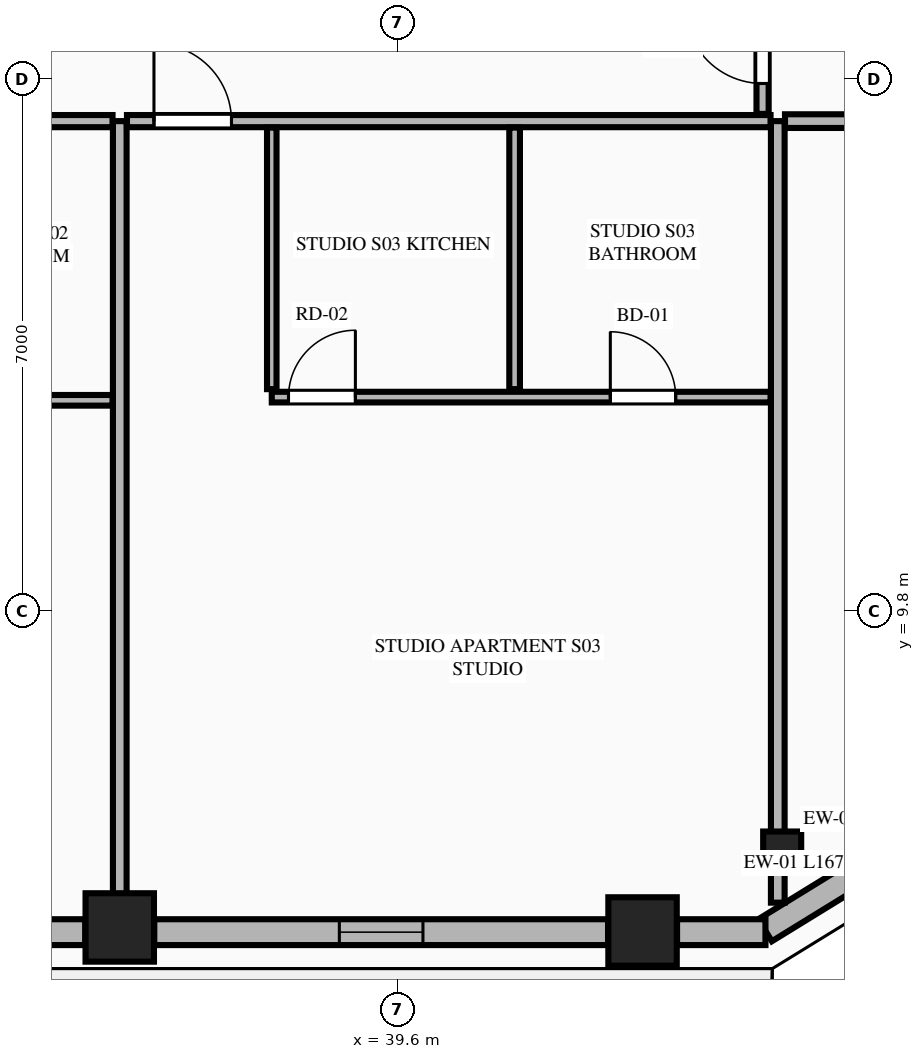
"""IFC4 building model, lengths in metres.
Left out: names, types, materials, properties, quantities, classifications, styles, units other than length and angle.
Written with IfcOpenShell. Run it as: python <this file> out.ifc"""

import sys

from ifc_helpers import new_model, si_unit, direction, frame, frame_2d, origin, origin_2d, place, context, subcontext, project, spatial, rectangle, extrude, element, fill, save


model = new_model("IFC4")
c1 = context("Model", 3, precision=1e-05, world=origin(), true_north=direction((0.0, 1.0)))
c2 = subcontext(c1, "Body", "Model", "MODEL_VIEW")
j1 = project(units=[si_unit("LENGTHUNIT", "METRE"), si_unit("PLANEANGLEUNIT", "RADIAN")], contexts=[c1])
p1 = place(None, origin())
s1 = spatial("IfcSite", under=j1, at=p1, CompositionType="ELEMENT")
p2 = place(p1, origin())
s2 = spatial("IfcBuilding", under=s1, at=p2, CompositionType="ELEMENT")
p3 = place(p2, frame((0.0, 0.0, 186.1)))
s3 = spatial("IfcBuildingStorey", under=s2, at=p3, CompositionType="ELEMENT", Elevation=186.1)
for number, where, z_axis, x_axis in (
    (1, (35.943, 5.642, 0.0), (0.0, 0.0, 1.0), (1.0, 0.0, 0.0)),
    (2, (42.821, 5.589, 0.0), (0.0, 0.0, 1.0), (1.0, 0.0, 0.0)),
):
    element("IfcColumn", number, at=place(p3, frame(where, z_axis=z_axis, x_axis=x_axis)), inside=s3, PredefinedType="COLUMN", context=c2, shape_type="SweptSolid", body=[
        extrude(rectangle(XDim=0.9, YDim=0.9, at=origin_2d()), origin(), (0.0, 0.0, 1.0), 3.55),
    ])
p4 = place(p3, frame((44.658, 6.654, 0.0), z_axis=(0.0, 0.0, 1.0), x_axis=(0.865230187018, 0.501374833306, 0.0)))
e3 = element("IfcColumn", 3, at=p4, inside=s3, PredefinedType="PILASTER", context=c2, shape_type="SweptSolid", body=[
    extrude(rectangle(XDim=0.5, YDim=0.35, at=origin_2d()), origin(), (0.0, 0.0, 1.0), 3.55),
])
p5 = place(p3, frame((44.433, 5.605, 0.0), z_axis=(0.0, 0.0, 1.0), x_axis=(0.851778214877, 0.523902541185, 0.0)))
e4 = element("IfcWall", 4, at=p5, inside=s3, PredefinedType="STANDARD", context=c2, shape_type="SweptSolid", body=[
    extrude(rectangle(XDim=1.678, YDim=0.34, at=frame_2d((0.839, 0.0))), origin(), (0.0, 0.0, 1.0), 3.35),
])
p6 = place(p3, frame((29.311, 5.58, 0.0), z_axis=(0.0, 0.0, 1.0), x_axis=(1.0, 0.0, 0.0)))
e5 = element("IfcWall", 5, at=p6, inside=s3, PredefinedType="STANDARD", context=c2, shape_type="SweptSolid", body=[
    extrude(rectangle(XDim=6.178, YDim=0.34, at=frame_2d((3.089, 0.0))), origin(), (0.0, 0.0, 1.0), 2.883),
])
p7 = place(p6, frame((2.539, 0.0, 0.0)))
e6 = element("IfcOpeningElement", 6, at=p7, cuts=e5, PredefinedType="OPENING", context=c2, shape_type="SweptSolid", body=[
    extrude(rectangle(XDim=1.1, YDim=2.25, at=frame_2d((0.55, 1.125))), frame((0.0, 0.18, 0.0), z_axis=(0.0, -1.0, 0.0), x_axis=(1.0, 0.0, 0.0)), (0.0, 0.0, 1.0), 0.36),
])
p8 = place(p3, frame((36.397, 5.58, 0.0), z_axis=(0.0, 0.0, 1.0), x_axis=(1.0, 0.0, 0.0)))
e7 = element("IfcWall", 7, at=p8, inside=s3, PredefinedType="STANDARD", context=c2, shape_type="SweptSolid", body=[
    extrude(rectangle(XDim=5.97, YDim=0.34, at=frame_2d((2.985, 0.0))), origin(), (0.0, 0.0, 1.0), 2.883),
])
p9 = place(p8, frame((2.435, 0.0, 0.75)))
e8 = element("IfcOpeningElement", 8, at=p9, cuts=e7, PredefinedType="OPENING", context=c2, shape_type="SweptSolid", body=[
    extrude(rectangle(XDim=1.1, YDim=1.983, at=frame_2d((0.55, 0.991))), frame((0.0, 0.18, 0.0), z_axis=(0.0, -1.0, 0.0), x_axis=(1.0, 0.0, 0.0)), (0.0, 0.0, 1.0), 0.36),
])
p10 = place(p3, frame((43.275, 5.58, 0.0), z_axis=(0.0, 0.0, 1.0), x_axis=(1.0, 0.0, 0.0)))
e9 = element("IfcWall", 9, at=p10, inside=s3, PredefinedType="STANDARD", context=c2, shape_type="SweptSolid", body=[
    extrude(rectangle(XDim=1.163, YDim=0.34, at=frame_2d((0.582, 0.0))), origin(), (0.0, 0.0, 1.0), 3.35),
])
p11 = place(p3, frame((35.943, 5.755, 0.0), z_axis=(0.0, 0.0, 1.0), x_axis=(0.0, 1.0, 0.0)))
e10 = element("IfcWall", 10, at=p11, inside=s3, PredefinedType="PARTITIONING", context=c2, shape_type="SweptSolid", body=[
    extrude(rectangle(XDim=10.495, YDim=0.18, at=frame_2d((5.248, 0.0))), origin(), (0.0, 0.0, 1.0), 2.807),
])
p12 = place(p3, frame((44.6, 5.968, 0.0), z_axis=(0.0, 0.0, 1.0), x_axis=(0.0, 1.0, 0.0)))
e11 = element("IfcWall", 11, at=p12, inside=s3, PredefinedType="PARTITIONING", context=c2, shape_type="SweptSolid", body=[
    extrude(rectangle(XDim=10.282, YDim=0.18, at=frame_2d((5.141, 0.0))), origin(), (0.0, 0.0, 1.0), 3.35),
])
p13 = place(p3, frame((28.952, 16.25, 0.0), z_axis=(0.0, 0.0, 1.0), x_axis=(1.0, 0.0, 0.0)))
e12 = element("IfcWall", 12, at=p13, inside=s3, PredefinedType="PARTITIONING", context=c2, shape_type="SweptSolid", body=[
    extrude(rectangle(XDim=6.896, YDim=0.16, at=frame_2d((3.448, 0.0))), origin(), (0.0, 0.0, 1.0), 3.35),
])
p14 = place(p13, frame((0.355, 0.0, 0.0)))
e13 = element("IfcOpeningElement", 13, at=p14, cuts=e12, PredefinedType="OPENING", context=c2, shape_type="SweptSolid", body=[
    extrude(rectangle(XDim=1.02, YDim=2.25, at=frame_2d((0.51, 1.125))), frame((0.0, 0.09, 0.0), z_axis=(0.0, -1.0, 0.0), x_axis=(1.0, 0.0, 0.0)), (0.0, 0.0, 1.0), 0.18),
])
p15 = place(p3, frame((30.857, 12.577, 0.0), z_axis=(0.0, 0.0, 1.0), x_axis=(1.0, 0.0, 0.0)))
e14 = element("IfcWall", 14, at=p15, inside=s3, PredefinedType="PLUMBINGWALL", context=c2, shape_type="SweptSolid", body=[
    extrude(rectangle(XDim=4.991, YDim=0.14, at=frame_2d((2.496, 0.0))), origin(), (0.0, 0.0, 1.0), 3.35),
])
p16 = place(p15, frame((3.291, 0.0, 0.0)))
e15 = element("IfcOpeningElement", 15, at=p16, cuts=e14, PredefinedType="OPENING", context=c2, shape_type="SweptSolid", body=[
    extrude(rectangle(XDim=0.86, YDim=2.1, at=frame_2d((0.43, 1.05))), frame((0.0, 0.08, 0.0), z_axis=(0.0, -1.0, 0.0), x_axis=(1.0, 0.0, 0.0)), (0.0, 0.0, 1.0), 0.16),
])
p17 = place(p15, frame((0.22, 0.0, 0.0)))
e16 = element("IfcOpeningElement", 16, at=p17, cuts=e14, PredefinedType="OPENING", context=c2, shape_type="SweptSolid", body=[
    extrude(rectangle(XDim=0.88, YDim=2.15, at=frame_2d((0.44, 1.075))), frame((0.0, 0.08, 0.0), z_axis=(0.0, -1.0, 0.0), x_axis=(1.0, 0.0, 0.0)), (0.0, 0.0, 1.0), 0.16),
])
p18 = place(p3, frame((36.038, 16.25, 0.0), z_axis=(0.0, 0.0, 1.0), x_axis=(1.0, 0.0, 0.0)))
e17 = element("IfcWall", 17, at=p18, inside=s3, PredefinedType="PARTITIONING", context=c2, shape_type="SweptSolid", body=[
    extrude(rectangle(XDim=8.467, YDim=0.16, at=frame_2d((4.233, 0.0))), origin(), (0.0, 0.0, 1.0), 3.35),
])
p19 = place(p18, frame((0.355, 0.0, 0.0)))
e18 = element("IfcOpeningElement", 18, at=p19, cuts=e17, PredefinedType="OPENING", context=c2, shape_type="SweptSolid", body=[
    extrude(rectangle(XDim=1.02, YDim=2.25, at=frame_2d((0.51, 1.125))), frame((0.0, 0.09, 0.0), z_axis=(0.0, -1.0, 0.0), x_axis=(1.0, 0.0, 0.0)), (0.0, 0.0, 1.0), 0.18),
])
p20 = place(p3, frame((37.943, 12.724, 0.0), z_axis=(0.0, 0.0, 1.0), x_axis=(0.0, 1.0, 0.0)))
e19 = element("IfcWall", 19, at=p20, inside=s3, PredefinedType="PARTITIONING", context=c2, shape_type="SweptSolid", body=[
    extrude(rectangle(XDim=3.441, YDim=0.125, at=frame_2d((1.72, 0.0))), origin(), (0.0, 0.0, 1.0), 3.35),
])
p21 = place(p3, frame((37.943, 12.619, 0.0), z_axis=(0.0, 0.0, 1.0), x_axis=(1.0, 0.0, 0.0)))
e20 = element("IfcWall", 20, at=p21, inside=s3, PredefinedType="PLUMBINGWALL", context=c2, shape_type="SweptSolid", body=[
    extrude(rectangle(XDim=6.562, YDim=0.14, at=frame_2d((3.281, 0.0))), origin(), (0.0, 0.0, 1.0), 3.35),
])
p22 = place(p21, frame((4.454, 0.0, 0.0)))
e21 = element("IfcOpeningElement", 21, at=p22, cuts=e20, PredefinedType="OPENING", context=c2, shape_type="SweptSolid", body=[
    extrude(rectangle(XDim=0.86, YDim=2.1, at=frame_2d((0.43, 1.05))), frame((0.0, 0.08, 0.0), z_axis=(0.0, -1.0, 0.0), x_axis=(1.0, 0.0, 0.0)), (0.0, 0.0, 1.0), 0.16),
])
p23 = place(p21, frame((0.22, 0.0, 0.0)))
e22 = element("IfcOpeningElement", 22, at=p23, cuts=e20, PredefinedType="OPENING", context=c2, shape_type="SweptSolid", body=[
    extrude(rectangle(XDim=0.88, YDim=2.15, at=frame_2d((0.44, 1.075))), frame((0.0, 0.08, 0.0), z_axis=(0.0, -1.0, 0.0), x_axis=(1.0, 0.0, 0.0)), (0.0, 0.0, 1.0), 0.16),
])
p24 = place(p3, frame((41.138, 12.724, 0.0), z_axis=(0.0, 0.0, 1.0), x_axis=(0.0, 1.0, 0.0)))
e23 = element("IfcWall", 23, at=p24, inside=s3, PredefinedType="PLUMBINGWALL", context=c2, shape_type="SweptSolid", body=[
    extrude(rectangle(XDim=3.441, YDim=0.14, at=frame_2d((1.72, 0.0))), origin(), (0.0, 0.0, 1.0), 3.35),
])
p25 = place(p3, frame((44.695, 16.25, 0.0), z_axis=(0.0, 0.0, 1.0), x_axis=(1.0, 0.0, 0.0)))
e24 = element("IfcWall", 24, at=p25, inside=s3, PredefinedType="PARTITIONING", context=c2, shape_type="SweptSolid", body=[
    extrude(rectangle(XDim=5.894, YDim=0.18, at=frame_2d((2.947, 0.0))), origin(), (0.0, 0.0, 1.0), 3.35),
])
p26 = place(p3, frame((44.4, 16.345, 0.0), z_axis=(0.0, 0.0, 1.0), x_axis=(0.0, 1.0, 0.0)))
e25 = element("IfcWall", 25, at=p26, inside=s3, PredefinedType="PARTITIONING", context=c2, shape_type="SweptSolid", body=[
    extrude(rectangle(XDim=6.236, YDim=0.16, at=frame_2d((3.118, 0.0))), origin(), (0.0, 0.0, 1.0), 3.35),
])
p27 = place(p26, frame((0.4, 0.0, 0.0)))
e26 = element("IfcOpeningElement", 26, at=p27, cuts=e25, PredefinedType="OPENING", context=c2, shape_type="SweptSolid", body=[
    extrude(rectangle(XDim=1.02, YDim=2.25, at=frame_2d((0.51, 1.125))), frame((0.0, 0.09, 0.0), z_axis=(0.0, -1.0, 0.0), x_axis=(1.0, 0.0, 0.0)), (0.0, 0.0, 1.0), 0.18),
])
p28 = place(p9, origin())
e27 = element("IfcWindow", 27, at=p28, inside=s3, PartitioningType="SINGLE_PANEL", PredefinedType="WINDOW", context=c2, shape_type="SweptSolid", body=[
    extrude(rectangle(XDim=1.1, YDim=1.983, at=frame_2d((0.55, 0.991))), frame((0.0, 0.03, 0.0), z_axis=(0.0, -1.0, 0.0), x_axis=(1.0, 0.0, 0.0)), (0.0, 0.0, 1.0), 0.06),
])
fill(e8, e27)
p29 = place(p22, origin())
e28 = element("IfcDoor", 28, at=p29, inside=s3, OperationType="SINGLE_SWING_LEFT", PredefinedType="DOOR", context=c2, shape_type="SweptSolid", body=[
    extrude(rectangle(XDim=0.86, YDim=2.1, at=frame_2d((0.43, 1.05))), frame((0.0, 0.025, 0.0), z_axis=(0.0, -1.0, 0.0), x_axis=(1.0, 0.0, 0.0)), (0.0, 0.0, 1.0), 0.05),
])
fill(e21, e28)
p30 = place(p19, origin())
e29 = element("IfcDoor", 29, at=p30, inside=s3, OperationType="SINGLE_SWING_LEFT", PredefinedType="DOOR", context=c2, shape_type="SweptSolid", body=[
    extrude(rectangle(XDim=1.02, YDim=2.25, at=frame_2d((0.51, 1.125))), frame((0.0, 0.025, 0.0), z_axis=(0.0, -1.0, 0.0), x_axis=(1.0, 0.0, 0.0)), (0.0, 0.0, 1.0), 0.05),
])
fill(e18, e29)
p31 = place(p23, origin())
e30 = element("IfcDoor", 30, at=p31, inside=s3, OperationType="SINGLE_SWING_RIGHT", PredefinedType="DOOR", context=c2, shape_type="SweptSolid", body=[
    extrude(rectangle(XDim=0.88, YDim=2.15, at=frame_2d((0.44, 1.075))), frame((0.0, 0.025, 0.0), z_axis=(0.0, -1.0, 0.0), x_axis=(1.0, 0.0, 0.0)), (0.0, 0.0, 1.0), 0.05),
])
fill(e22, e30)
p32 = place(p27, origin())
e31 = element("IfcDoor", 31, at=p32, inside=s3, OperationType="SINGLE_SWING_RIGHT", PredefinedType="DOOR", context=c2, shape_type="SweptSolid", body=[
    extrude(rectangle(XDim=1.02, YDim=2.25, at=frame_2d((0.51, 1.125))), frame((0.0, 0.025, 0.0), z_axis=(0.0, -1.0, 0.0), x_axis=(1.0, 0.0, 0.0)), (0.0, 0.0, 1.0), 0.05),
])
fill(e26, e31)
save(model, sys.argv[1])
